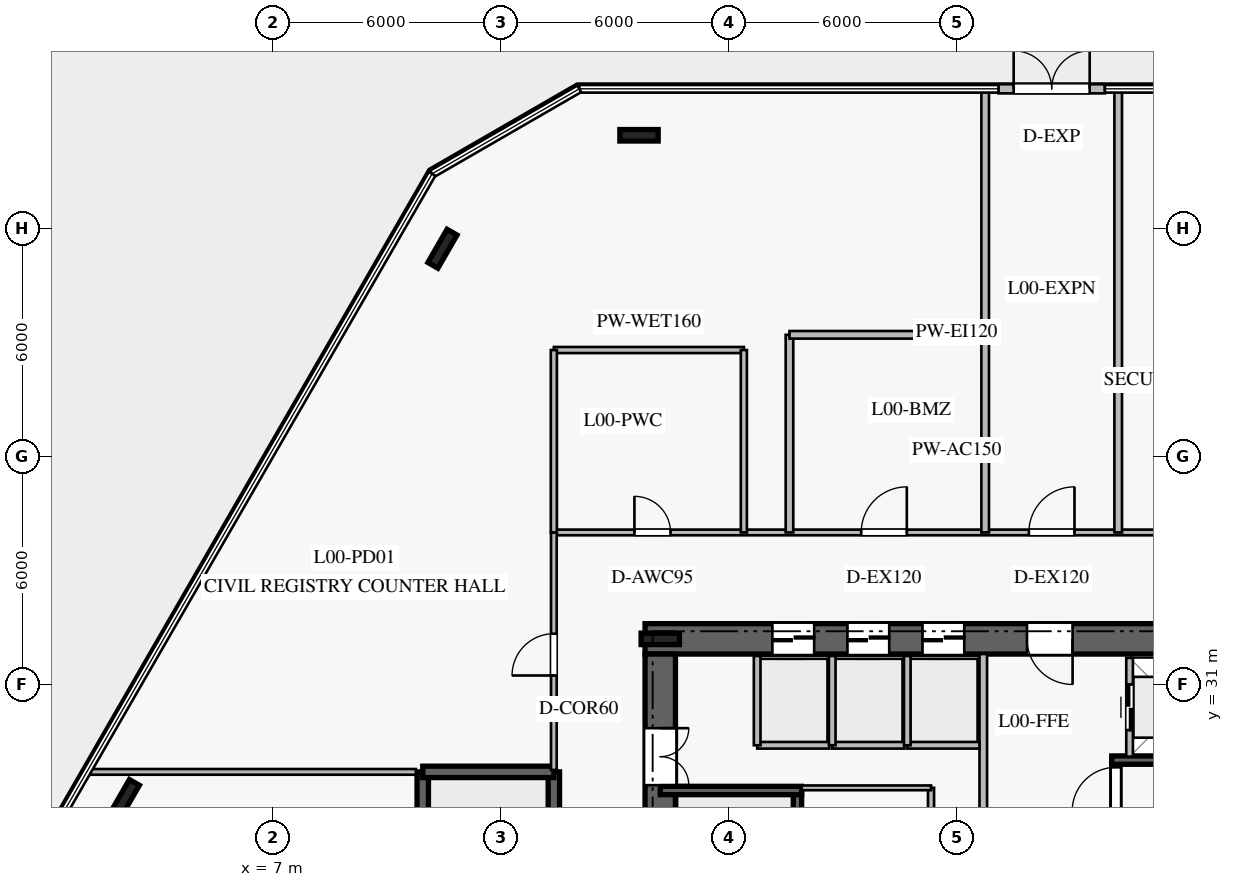
"""IFC4 building model, lengths in metres.
Left out: names, types, materials, properties, quantities, classifications, styles, units other than length and angle.
Written with IfcOpenShell. Run it as: python <this file> out.ifc"""

import sys

from ifc_helpers import new_model, si_unit, direction, frame, frame_2d, origin, origin_2d, place, context, subcontext, project, spatial, rectangle, i_section, extrude, element, fill, save


model = new_model("IFC4")
c1 = context("Model", 3, precision=1e-05, world=origin(), true_north=direction((0.0, 1.0)))
c2 = subcontext(c1, "Body", "Model", "MODEL_VIEW")
j1 = project(units=[si_unit("LENGTHUNIT", "METRE"), si_unit("PLANEANGLEUNIT", "RADIAN")], contexts=[c1])
p1 = place(None, origin())
s1 = spatial("IfcSite", under=j1, at=p1, CompositionType="ELEMENT")
p2 = place(p1, origin())
s2 = spatial("IfcBuilding", under=s1, at=p2, CompositionType="ELEMENT")
p3 = place(p2, origin())
s3 = spatial("IfcBuildingStorey", under=s2, at=p3, CompositionType="ELEMENT", Elevation=0.0)
p4 = place(p3, frame((33.2, 32.2, 0.0), z_axis=(0.0, 0.0, 1.0), x_axis=(-1.0, 0.0, 0.0)))
e1 = element("IfcWall", 1, at=p4, inside=s3, PredefinedType="SHEAR", context=c2, shape_type="SweptSolid", body=[
    extrude(rectangle(XDim=16.4, YDim=0.8, at=frame_2d((8.2, 0.0))), origin(), (0.0, 0.0, 1.0), 4.94),
])
p5 = place(p4, frame((5.15, 0.0, 0.0)))
e2 = element("IfcOpeningElement", 2, at=p5, cuts=e1, PredefinedType="OPENING", context=c2, shape_type="SweptSolid", body=[
    extrude(rectangle(XDim=1.2, YDim=2.25, at=frame_2d((0.6, 1.125))), frame((0.0, 0.41, 0.0), z_axis=(0.0, -1.0, 0.0), x_axis=(1.0, 0.0, 0.0)), (0.0, 0.0, 1.0), 0.82),
])
p6 = place(p4, frame((11.95, 0.0, 0.0)))
e3 = element("IfcOpeningElement", 3, at=p6, cuts=e1, PredefinedType="OPENING", context=c2, shape_type="SweptSolid", body=[
    extrude(rectangle(XDim=1.1, YDim=2.2, at=frame_2d((0.55, 1.1))), frame((0.0, 0.41, 0.0), z_axis=(0.0, -1.0, 0.0), x_axis=(1.0, 0.0, 0.0)), (0.0, 0.0, 1.0), 0.82),
])
p7 = place(p4, frame((9.975, 0.0, 0.0)))
e4 = element("IfcOpeningElement", 4, at=p7, cuts=e1, PredefinedType="OPENING", context=c2, shape_type="SweptSolid", body=[
    extrude(rectangle(XDim=1.1, YDim=2.2, at=frame_2d((0.55, 1.1))), frame((0.0, 0.41, 0.0), z_axis=(0.0, -1.0, 0.0), x_axis=(1.0, 0.0, 0.0)), (0.0, 0.0, 1.0), 0.82),
])
p8 = place(p4, frame((8.0, 0.0, 0.0)))
e5 = element("IfcOpeningElement", 5, at=p8, cuts=e1, PredefinedType="OPENING", context=c2, shape_type="SweptSolid", body=[
    extrude(rectangle(XDim=1.1, YDim=2.2, at=frame_2d((0.55, 1.1))), frame((0.0, 0.41, 0.0), z_axis=(0.0, -1.0, 0.0), x_axis=(1.0, 0.0, 0.0)), (0.0, 0.0, 1.0), 0.82),
])
p9 = place(p3, frame((17.2, 31.8, 0.0), z_axis=(0.0, 0.0, 1.0), x_axis=(0.0, -1.0, 0.0)))
e6 = element("IfcWall", 6, at=p9, inside=s3, PredefinedType="SHEAR", context=c2, shape_type="SweptSolid", body=[
    extrude(rectangle(XDim=13.6, YDim=0.8, at=frame_2d((6.8, 0.0))), origin(), (0.0, 0.0, 1.0), 4.94),
])
p10 = place(p9, frame((1.95, 0.0, 0.0)))
e7 = element("IfcOpeningElement", 7, at=p10, cuts=e6, PredefinedType="OPENING", context=c2, shape_type="SweptSolid", body=[
    extrude(rectangle(XDim=1.5, YDim=2.2, at=frame_2d((0.75, 1.1))), frame((0.0, 0.41, 0.0), z_axis=(0.0, -1.0, 0.0), x_axis=(1.0, 0.0, 0.0)), (0.0, 0.0, 1.0), 0.82),
])
p11 = place(p3, frame((17.2, 32.2, 0.0), z_axis=(0.0, 0.0, 1.0), x_axis=(1.0, 0.0, 0.0)))
e8 = element("IfcColumn", 8, at=p11, inside=s3, PredefinedType="COLUMN", context=c2, shape_type="SweptSolid", body=[
    extrude(i_section(OverallWidth=0.302, OverallDepth=1.008, WebThickness=0.021, FlangeThickness=0.04, at=origin_2d()), origin(), (0.0, 0.0, 1.0), 5.2),
])
p12 = place(p3, frame((20.81, 20.99, 0.0), z_axis=(0.0, 0.0, 1.0), x_axis=(0.0, 1.0, 0.0)))
e9 = element("IfcWall", 9, at=p12, inside=s3, PredefinedType="SOLIDWALL", context=c2, shape_type="SweptSolid", body=[
    extrude(rectangle(XDim=7.22, YDim=0.22, at=frame_2d((3.61, 0.0))), origin(), (0.0, 0.0, 1.0), 4.94),
])
p13 = place(p12, frame((0.18, 0.0, 0.0)))
e10 = element("IfcOpeningElement", 10, at=p13, cuts=e9, PredefinedType="OPENING", context=c2, shape_type="SweptSolid", body=[
    extrude(rectangle(XDim=1.15, YDim=2.2, at=frame_2d((0.575, 1.1))), frame((0.0, 0.12, 0.0), z_axis=(0.0, -1.0, 0.0), x_axis=(1.0, 0.0, 0.0)), (0.0, 0.0, 1.0), 0.24),
])
p14 = place(p3, frame((17.2, 28.21, 0.0), z_axis=(0.0, 0.0, 1.0), x_axis=(1.0, 0.0, 0.0)))
e11 = element("IfcWall", 11, at=p14, inside=s3, PredefinedType="SOLIDWALL", context=c2, shape_type="SweptSolid", body=[
    extrude(rectangle(XDim=3.72, YDim=0.22, at=frame_2d((1.86, 0.0))), origin(), (0.0, 0.0, 1.0), 4.94),
])
p15 = place(p3, frame((29.19, 21.79, 0.0), z_axis=(0.0, 0.0, 1.0), x_axis=(0.0, 1.0, 0.0)))
e12 = element("IfcWall", 12, at=p15, inside=s3, PredefinedType="SOLIDWALL", context=c2, shape_type="SweptSolid", body=[
    extrude(rectangle(XDim=7.22, YDim=0.22, at=frame_2d((3.61, 0.0))), origin(), (0.0, 0.0, 1.0), 4.94),
])
p16 = place(p15, frame((5.88, 0.0, 0.0)))
e13 = element("IfcOpeningElement", 13, at=p16, cuts=e12, PredefinedType="OPENING", context=c2, shape_type="SweptSolid", body=[
    extrude(rectangle(XDim=1.15, YDim=2.2, at=frame_2d((0.575, 1.1))), frame((0.0, 0.12, 0.0), z_axis=(0.0, -1.0, 0.0), x_axis=(1.0, 0.0, 0.0)), (0.0, 0.0, 1.0), 0.24),
])
p17 = place(p3, frame((29.08, 29.01, 0.0), z_axis=(0.0, 0.0, 1.0), x_axis=(1.0, 0.0, 0.0)))
e14 = element("IfcWall", 14, at=p17, inside=s3, PredefinedType="SOLIDWALL", context=c2, shape_type="SweptSolid", body=[
    extrude(rectangle(XDim=3.72, YDim=0.22, at=frame_2d((1.86, 0.0))), origin(), (0.0, 0.0, 1.0), 4.94),
])
p18 = place(p3, frame((14.4, 21.3, 0.0), z_axis=(0.0, 0.0, 1.0), x_axis=(0.0, 1.0, 0.0)))
e15 = element("IfcWall", 15, at=p18, inside=s3, PredefinedType="SOLIDWALL", context=c2, shape_type="SweptSolid", body=[
    extrude(rectangle(XDim=7.4, YDim=0.3, at=frame_2d((3.7, 0.0))), origin(), (0.0, 0.0, 1.0), 4.94),
])
p19 = place(p18, frame((0.22, 0.0, 0.0)))
e16 = element("IfcOpeningElement", 16, at=p19, cuts=e15, PredefinedType="OPENING", context=c2, shape_type="SweptSolid", body=[
    extrude(rectangle(XDim=1.15, YDim=2.2, at=frame_2d((0.575, 1.1))), frame((0.0, 0.16, 0.0), z_axis=(0.0, -1.0, 0.0), x_axis=(1.0, 0.0, 0.0)), (0.0, 0.0, 1.0), 0.32),
])
p20 = place(p3, frame((10.95, 21.3, 0.0), z_axis=(0.0, 0.0, 1.0), x_axis=(0.0, 1.0, 0.0)))
e17 = element("IfcWall", 17, at=p20, inside=s3, PredefinedType="SOLIDWALL", context=c2, shape_type="SweptSolid", body=[
    extrude(rectangle(XDim=7.4, YDim=0.3, at=frame_2d((3.7, 0.0))), origin(), (0.0, 0.0, 1.0), 4.94),
])
p21 = place(p3, frame((10.95, 28.7, 0.0), z_axis=(0.0, 0.0, 1.0), x_axis=(1.0, 0.0, 0.0)))
e18 = element("IfcWall", 18, at=p21, inside=s3, PredefinedType="SOLIDWALL", context=c2, shape_type="SweptSolid", body=[
    extrude(rectangle(XDim=3.45, YDim=0.3, at=frame_2d((1.725, 0.0))), origin(), (0.0, 0.0, 1.0), 4.94),
])
for number, where, z_axis, x_axis in (
    (19, (16.641, 45.45, 0.0), (0.0, 0.0, 1.0), (1.0, 0.0, 0.0)),
    (20, (11.469, 42.464, 0.0), (0.0, 0.0, 1.0), (0.5, 0.866, 0.0)),
    (21, (3.11, 27.986, 0.0), (0.0, 0.0, 1.0), (0.5, 0.866, 0.0)),
):
    element("IfcColumn", number, at=place(p3, frame(where, z_axis=z_axis, x_axis=x_axis)), inside=s3, PredefinedType="COLUMN", context=c2, shape_type="SweptSolid", body=[
        extrude(i_section(OverallWidth=0.302, OverallDepth=1.008, WebThickness=0.021, FlangeThickness=0.04, at=origin_2d()), origin(), (0.0, 0.0, 1.0), 5.2),
    ])
p22 = place(p3, frame((28.9, 46.673, 0.0), z_axis=(0.0, 0.0, 1.0), x_axis=(-1.0, 0.0, 0.0)))
e22 = element("IfcWall", 22, at=p22, inside=s3, PredefinedType="STANDARD", context=c2, shape_type="SweptSolid", body=[
    extrude(rectangle(XDim=2.8, YDim=0.24, at=frame_2d((1.4, 0.0))), origin(), (0.0, 0.0, 1.0), 4.94),
])
p23 = place(p22, frame((0.4, 0.0, 0.0)))
e23 = element("IfcOpeningElement", 23, at=p23, cuts=e22, PredefinedType="OPENING", context=c2, shape_type="SweptSolid", body=[
    extrude(rectangle(XDim=2.0, YDim=2.4, at=frame_2d((1.0, 1.2))), frame((0.0, 0.13, 0.0), z_axis=(0.0, -1.0, 0.0), x_axis=(1.0, 0.0, 0.0)), (0.0, 0.0, 1.0), 0.26),
])
p24 = place(p3, frame((25.7, 26.65, 0.0), z_axis=(0.0, 0.0, 1.0), x_axis=(0.0, 1.0, 0.0)))
e24 = element("IfcWall", 24, at=p24, inside=s3, PredefinedType="PARTITIONING", context=c2, shape_type="SweptSolid", body=[
    extrude(rectangle(XDim=5.15, YDim=0.2, at=frame_2d((2.575, 0.0))), origin(), (0.0, 0.0, 1.0), 4.94),
])
p25 = place(p3, frame((24.325, 23.35, 0.0), z_axis=(0.0, 0.0, 1.0), x_axis=(0.0, 1.0, 0.0)))
e25 = element("IfcWall", 25, at=p25, inside=s3, PredefinedType="PLUMBINGWALL", context=c2, shape_type="SweptSolid", body=[
    extrude(rectangle(XDim=4.93, YDim=0.16, at=frame_2d((2.465, 0.0))), origin(), (0.0, 0.0, 1.0), 4.94),
])
p26 = place(p25, frame((0.8, 0.0, 0.0)))
e26 = element("IfcOpeningElement", 26, at=p26, cuts=e25, PredefinedType="OPENING", context=c2, shape_type="SweptSolid", body=[
    extrude(rectangle(XDim=0.95, YDim=2.1, at=frame_2d((0.475, 1.05))), frame((0.0, 0.09, 0.0), z_axis=(0.0, -1.0, 0.0), x_axis=(1.0, 0.0, 0.0)), (0.0, 0.0, 1.0), 0.18),
])
p27 = place(p25, frame((3.26, 0.0, 0.0)))
e27 = element("IfcOpeningElement", 27, at=p27, cuts=e25, PredefinedType="OPENING", context=c2, shape_type="SweptSolid", body=[
    extrude(rectangle(XDim=0.9, YDim=2.1, at=frame_2d((0.45, 1.05))), frame((0.0, 0.09, 0.0), z_axis=(0.0, -1.0, 0.0), x_axis=(1.0, 0.0, 0.0)), (0.0, 0.0, 1.0), 0.18),
])
p28 = place(p3, frame((20.92, 28.28, 0.0), z_axis=(0.0, 0.0, 1.0), x_axis=(1.0, 0.0, 0.0)))
e28 = element("IfcWall", 28, at=p28, inside=s3, PredefinedType="PARTITIONING", context=c2, shape_type="SweptSolid", body=[
    extrude(rectangle(XDim=3.405, YDim=0.125, at=frame_2d((1.703, 0.0))), origin(), (0.0, 0.0, 1.0), 4.94),
])
p29 = place(p3, frame((19.75, 29.4, 0.0), z_axis=(0.0, 0.0, 1.0), x_axis=(1.0, 0.0, 0.0)))
e29 = element("IfcWall", 29, at=p29, inside=s3, PredefinedType="PARTITIONING", context=c2, shape_type="SweptSolid", body=[
    extrude(rectangle(XDim=1.9, YDim=0.175, at=frame_2d((0.95, 0.0))), origin(), (0.0, 0.0, 1.0), 4.94),
])
p30 = place(p3, frame((19.75, 29.4, 0.0), z_axis=(0.0, 0.0, 1.0), x_axis=(0.0, 1.0, 0.0)))
e30 = element("IfcWall", 30, at=p30, inside=s3, PredefinedType="PARTITIONING", context=c2, shape_type="SweptSolid", body=[
    extrude(rectangle(XDim=2.35, YDim=0.175, at=frame_2d((1.175, 0.0))), origin(), (0.0, 0.0, 1.0), 4.94),
])
p31 = place(p3, frame((21.725, 29.4, 0.0), z_axis=(0.0, 0.0, 1.0), x_axis=(1.0, 0.0, 0.0)))
e31 = element("IfcWall", 31, at=p31, inside=s3, PredefinedType="PARTITIONING", context=c2, shape_type="SweptSolid", body=[
    extrude(rectangle(XDim=1.9, YDim=0.175, at=frame_2d((0.95, 0.0))), origin(), (0.0, 0.0, 1.0), 4.94),
])
p32 = place(p3, frame((21.725, 29.4, 0.0), z_axis=(0.0, 0.0, 1.0), x_axis=(0.0, 1.0, 0.0)))
e32 = element("IfcWall", 32, at=p32, inside=s3, PredefinedType="PARTITIONING", context=c2, shape_type="SweptSolid", body=[
    extrude(rectangle(XDim=2.35, YDim=0.175, at=frame_2d((1.175, 0.0))), origin(), (0.0, 0.0, 1.0), 4.94),
])
p33 = place(p3, frame((23.7, 29.4, 0.0), z_axis=(0.0, 0.0, 1.0), x_axis=(1.0, 0.0, 0.0)))
e33 = element("IfcWall", 33, at=p33, inside=s3, PredefinedType="PARTITIONING", context=c2, shape_type="SweptSolid", body=[
    extrude(rectangle(XDim=1.9, YDim=0.175, at=frame_2d((0.95, 0.0))), origin(), (0.0, 0.0, 1.0), 4.94),
])
p34 = place(p3, frame((23.7, 29.4, 0.0), z_axis=(0.0, 0.0, 1.0), x_axis=(0.0, 1.0, 0.0)))
e34 = element("IfcWall", 34, at=p34, inside=s3, PredefinedType="PARTITIONING", context=c2, shape_type="SweptSolid", body=[
    extrude(rectangle(XDim=2.35, YDim=0.175, at=frame_2d((1.175, 0.0))), origin(), (0.0, 0.0, 1.0), 4.94),
])
p35 = place(p3, frame((29.55, 29.1, 0.0), z_axis=(0.0, 0.0, 1.0), x_axis=(0.0, 1.0, 0.0)))
e35 = element("IfcWall", 35, at=p35, inside=s3, PredefinedType="PARTITIONING", context=c2, shape_type="SweptSolid", body=[
    extrude(rectangle(XDim=2.6, YDim=0.175, at=frame_2d((1.3, 0.0))), origin(), (0.0, 0.0, 1.0), 4.94),
])
p36 = place(p35, frame((0.7, 0.0, 0.0)))
e36 = element("IfcOpeningElement", 36, at=p36, cuts=e35, PredefinedType="OPENING", context=c2, shape_type="SweptSolid", body=[
    extrude(rectangle(XDim=1.2, YDim=2.2, at=frame_2d((0.6, 1.1))), frame((0.0, 0.098, 0.0), z_axis=(0.0, -1.0, 0.0), x_axis=(1.0, 0.0, 0.0)), (0.0, 0.0, 1.0), 0.195),
])
p37 = place(p3, frame((14.4, 35.0, 0.0), z_axis=(0.0, 0.0, 1.0), x_axis=(1.0, 0.0, 0.0)))
e37 = element("IfcWall", 37, at=p37, inside=s3, PredefinedType="PARTITIONING", context=c2, shape_type="SweptSolid", body=[
    extrude(rectangle(XDim=21.2, YDim=0.15, at=frame_2d((10.6, 0.0))), origin(), (0.0, 0.0, 1.0), 4.39),
])
p38 = place(p37, frame((12.5, 0.0, 0.0)))
e38 = element("IfcOpeningElement", 38, at=p38, cuts=e37, PredefinedType="OPENING", context=c2, shape_type="SweptSolid", body=[
    extrude(rectangle(XDim=1.2, YDim=2.25, at=frame_2d((0.6, 1.125))), frame((0.0, 0.085, 0.0), z_axis=(0.0, -1.0, 0.0), x_axis=(1.0, 0.0, 0.0)), (0.0, 0.0, 1.0), 0.17),
])
p39 = place(p37, frame((2.12, 0.0, 0.0)))
e39 = element("IfcOpeningElement", 39, at=p39, cuts=e37, PredefinedType="OPENING", context=c2, shape_type="SweptSolid", body=[
    extrude(rectangle(XDim=0.95, YDim=2.1, at=frame_2d((0.475, 1.05))), frame((0.0, 0.085, 0.0), z_axis=(0.0, -1.0, 0.0), x_axis=(1.0, 0.0, 0.0)), (0.0, 0.0, 1.0), 0.17),
])
p40 = place(p37, frame((8.088, 0.0, 0.0)))
e40 = element("IfcOpeningElement", 40, at=p40, cuts=e37, PredefinedType="OPENING", context=c2, shape_type="SweptSolid", body=[
    extrude(rectangle(XDim=1.2, YDim=2.25, at=frame_2d((0.6, 1.125))), frame((0.0, 0.085, 0.0), z_axis=(0.0, -1.0, 0.0), x_axis=(1.0, 0.0, 0.0)), (0.0, 0.0, 1.0), 0.17),
])
p41 = place(p37, frame((17.291, 0.0, 0.0)))
e41 = element("IfcOpeningElement", 41, at=p41, cuts=e37, PredefinedType="OPENING", context=c2, shape_type="SweptSolid", body=[
    extrude(rectangle(XDim=1.1, YDim=2.2, at=frame_2d((0.55, 1.1))), frame((0.0, 0.085, 0.0), z_axis=(0.0, -1.0, 0.0), x_axis=(1.0, 0.0, 0.0)), (0.0, 0.0, 1.0), 0.17),
])
p42 = place(p3, frame((14.4, 28.75, 0.0), z_axis=(0.0, 0.0, 1.0), x_axis=(0.0, 1.0, 0.0)))
e42 = element("IfcWall", 42, at=p42, inside=s3, PredefinedType="PARTITIONING", context=c2, shape_type="SweptSolid", body=[
    extrude(rectangle(XDim=6.25, YDim=0.15, at=frame_2d((3.125, 0.0))), origin(), (0.0, 0.0, 1.0), 4.94),
])
p43 = place(p42, frame((2.486, 0.0, 0.0)))
e43 = element("IfcOpeningElement", 43, at=p43, cuts=e42, PredefinedType="OPENING", context=c2, shape_type="SweptSolid", body=[
    extrude(rectangle(XDim=1.1, YDim=2.2, at=frame_2d((0.55, 1.1))), frame((0.0, 0.085, 0.0), z_axis=(0.0, -1.0, 0.0), x_axis=(1.0, 0.0, 0.0)), (0.0, 0.0, 1.0), 0.17),
])
p44 = place(p3, frame((14.4, 39.8, 0.0), z_axis=(0.0, 0.0, 1.0), x_axis=(1.0, 0.0, 0.0)))
e44 = element("IfcWall", 44, at=p44, inside=s3, PredefinedType="PLUMBINGWALL", context=c2, shape_type="SweptSolid", body=[
    extrude(rectangle(XDim=5.0, YDim=0.16, at=frame_2d((2.5, 0.0))), origin(), (0.0, 0.0, 1.0), 4.39),
])
p45 = place(p3, frame((19.4, 35.0, 0.0), z_axis=(0.0, 0.0, 1.0), x_axis=(0.0, 1.0, 0.0)))
e45 = element("IfcWall", 45, at=p45, inside=s3, PredefinedType="PLUMBINGWALL", context=c2, shape_type="SweptSolid", body=[
    extrude(rectangle(XDim=4.8, YDim=0.16, at=frame_2d((2.4, 0.0))), origin(), (0.0, 0.0, 1.0), 4.94),
])
p46 = place(p3, frame((14.4, 35.0, 0.0), z_axis=(0.0, 0.0, 1.0), x_axis=(0.0, 1.0, 0.0)))
e46 = element("IfcWall", 46, at=p46, inside=s3, PredefinedType="PLUMBINGWALL", context=c2, shape_type="SweptSolid", body=[
    extrude(rectangle(XDim=4.8, YDim=0.16, at=frame_2d((2.4, 0.0))), origin(), (0.0, 0.0, 1.0), 4.39),
])
for number, where, z_axis, x_axis in (
    (47, (25.75, 35.0, 0.0), (0.0, 0.0, 1.0), (0.0, 1.0, 0.0)),
    (48, (29.25, 35.0, 0.0), (0.0, 0.0, 1.0), (0.0, 1.0, 0.0)),
):
    element("IfcWall", number, at=place(p3, frame(where, z_axis=z_axis, x_axis=x_axis)), inside=s3, PredefinedType="PARTITIONING", context=c2, shape_type="SweptSolid", body=[
        extrude(rectangle(XDim=11.65, YDim=0.2, at=frame_2d((5.825, 0.0))), origin(), (0.0, 0.0, 1.0), 4.24),
    ])
p47 = place(p3, frame((20.6, 35.0, 0.0), z_axis=(0.0, 0.0, 1.0), x_axis=(0.0, 1.0, 0.0)))
e49 = element("IfcWall", 49, at=p47, inside=s3, PredefinedType="PARTITIONING", context=c2, shape_type="SweptSolid", body=[
    extrude(rectangle(XDim=5.2, YDim=0.2, at=frame_2d((2.6, 0.0))), origin(), (0.0, 0.0, 1.0), 4.94),
])
p48 = place(p3, frame((20.6, 40.2, 0.0), z_axis=(0.0, 0.0, 1.0), x_axis=(1.0, 0.0, 0.0)))
e50 = element("IfcWall", 50, at=p48, inside=s3, PredefinedType="PARTITIONING", context=c2, shape_type="SweptSolid", body=[
    extrude(rectangle(XDim=5.15, YDim=0.2, at=frame_2d((2.575, 0.0))), origin(), (0.0, 0.0, 1.0), 4.94),
])
p49 = place(p3, frame((2.08, 28.7, 0.0), z_axis=(0.0, 0.0, 1.0), x_axis=(1.0, 0.0, 0.0)))
e51 = element("IfcWall", 51, at=p49, inside=s3, PredefinedType="PARTITIONING", context=c2, shape_type="SweptSolid", body=[
    extrude(rectangle(XDim=8.69, YDim=0.15, at=frame_2d((4.345, 0.0))), origin(), (0.0, 0.0, 1.0), 4.24),
])
p50 = place(p23, frame((2.0, 0.0, 0.0), z_axis=(0.0, 0.0, 1.0), x_axis=(-1.0, 0.0, 0.0)))
e52 = element("IfcDoor", 52, at=p50, inside=s3, OperationType="DOUBLE_DOOR_SINGLE_SWING", PredefinedType="DOOR", context=c2, shape_type="SweptSolid", body=[
    extrude(rectangle(XDim=2.0, YDim=2.4, at=frame_2d((1.0, 1.2))), frame((0.0, 0.025, 0.0), z_axis=(0.0, -1.0, 0.0), x_axis=(1.0, 0.0, 0.0)), (0.0, 0.0, 1.0), 0.05),
])
fill(e23, e52)
p51 = place(p16, origin())
e53 = element("IfcDoor", 53, at=p51, inside=s3, OperationType="SINGLE_SWING_LEFT", PredefinedType="DOOR", context=c2, shape_type="SweptSolid", body=[
    extrude(rectangle(XDim=1.15, YDim=2.2, at=frame_2d((0.575, 1.1))), frame((0.0, 0.025, 0.0), z_axis=(0.0, -1.0, 0.0), x_axis=(1.0, 0.0, 0.0)), (0.0, 0.0, 1.0), 0.05),
])
fill(e13, e53)
p52 = place(p5, origin())
e54 = element("IfcDoor", 54, at=p52, inside=s3, OperationType="SINGLE_SWING_LEFT", PredefinedType="DOOR", context=c2, shape_type="SweptSolid", body=[
    extrude(rectangle(XDim=1.2, YDim=2.25, at=frame_2d((0.6, 1.125))), frame((0.0, 0.025, 0.0), z_axis=(0.0, -1.0, 0.0), x_axis=(1.0, 0.0, 0.0)), (0.0, 0.0, 1.0), 0.05),
])
fill(e2, e54)
p53 = place(p10, origin())
e55 = element("IfcDoor", 55, at=p53, inside=s3, OperationType="DOUBLE_DOOR_SINGLE_SWING", PredefinedType="DOOR", context=c2, shape_type="SweptSolid", body=[
    extrude(rectangle(XDim=1.5, YDim=2.2, at=frame_2d((0.75, 1.1))), frame((0.0, 0.025, 0.0), z_axis=(0.0, -1.0, 0.0), x_axis=(1.0, 0.0, 0.0)), (0.0, 0.0, 1.0), 0.05),
])
fill(e7, e55)
p54 = place(p6, origin())
e56 = element("IfcDoor", 56, at=p54, inside=s3, OperationType="DOUBLE_DOOR_SLIDING", PredefinedType="DOOR", context=c2, shape_type="SweptSolid", body=[
    extrude(rectangle(XDim=1.1, YDim=2.2, at=frame_2d((0.55, 1.1))), frame((0.0, 0.025, 0.0), z_axis=(0.0, -1.0, 0.0), x_axis=(1.0, 0.0, 0.0)), (0.0, 0.0, 1.0), 0.05),
])
fill(e3, e56)
p55 = place(p7, origin())
e57 = element("IfcDoor", 57, at=p55, inside=s3, OperationType="DOUBLE_DOOR_SLIDING", PredefinedType="DOOR", context=c2, shape_type="SweptSolid", body=[
    extrude(rectangle(XDim=1.1, YDim=2.2, at=frame_2d((0.55, 1.1))), frame((0.0, 0.025, 0.0), z_axis=(0.0, -1.0, 0.0), x_axis=(1.0, 0.0, 0.0)), (0.0, 0.0, 1.0), 0.05),
])
fill(e4, e57)
p56 = place(p8, origin())
e58 = element("IfcDoor", 58, at=p56, inside=s3, OperationType="DOUBLE_DOOR_SLIDING", PredefinedType="DOOR", context=c2, shape_type="SweptSolid", body=[
    extrude(rectangle(XDim=1.1, YDim=2.2, at=frame_2d((0.55, 1.1))), frame((0.0, 0.025, 0.0), z_axis=(0.0, -1.0, 0.0), x_axis=(1.0, 0.0, 0.0)), (0.0, 0.0, 1.0), 0.05),
])
fill(e5, e58)
p57 = place(p36, origin())
e59 = element("IfcDoor", 59, at=p57, inside=s3, OperationType="DOUBLE_DOOR_SLIDING", PredefinedType="DOOR", context=c2, shape_type="SweptSolid", body=[
    extrude(rectangle(XDim=1.2, YDim=2.2, at=frame_2d((0.6, 1.1))), frame((0.0, 0.025, 0.0), z_axis=(0.0, -1.0, 0.0), x_axis=(1.0, 0.0, 0.0)), (0.0, 0.0, 1.0), 0.05),
])
fill(e36, e59)
p58 = place(p38, origin())
e60 = element("IfcDoor", 60, at=p58, inside=s3, OperationType="SINGLE_SWING_RIGHT", PredefinedType="DOOR", context=c2, shape_type="SweptSolid", body=[
    extrude(rectangle(XDim=1.2, YDim=2.25, at=frame_2d((0.6, 1.125))), frame((0.0, 0.025, 0.0), z_axis=(0.0, -1.0, 0.0), x_axis=(1.0, 0.0, 0.0)), (0.0, 0.0, 1.0), 0.05),
])
fill(e38, e60)
p59 = place(p39, origin())
e61 = element("IfcDoor", 61, at=p59, inside=s3, OperationType="SINGLE_SWING_LEFT", PredefinedType="DOOR", context=c2, shape_type="SweptSolid", body=[
    extrude(rectangle(XDim=0.95, YDim=2.1, at=frame_2d((0.475, 1.05))), frame((0.0, 0.025, 0.0), z_axis=(0.0, -1.0, 0.0), x_axis=(1.0, 0.0, 0.0)), (0.0, 0.0, 1.0), 0.05),
])
fill(e39, e61)
p60 = place(p40, origin())
e62 = element("IfcDoor", 62, at=p60, inside=s3, OperationType="SINGLE_SWING_RIGHT", PredefinedType="DOOR", context=c2, shape_type="SweptSolid", body=[
    extrude(rectangle(XDim=1.2, YDim=2.25, at=frame_2d((0.6, 1.125))), frame((0.0, 0.025, 0.0), z_axis=(0.0, -1.0, 0.0), x_axis=(1.0, 0.0, 0.0)), (0.0, 0.0, 1.0), 0.05),
])
fill(e40, e62)
p61 = place(p43, origin())
e63 = element("IfcDoor", 63, at=p61, inside=s3, OperationType="SINGLE_SWING_LEFT", PredefinedType="DOOR", context=c2, shape_type="SweptSolid", body=[
    extrude(rectangle(XDim=1.1, YDim=2.2, at=frame_2d((0.55, 1.1))), frame((0.0, 0.025, 0.0), z_axis=(0.0, -1.0, 0.0), x_axis=(1.0, 0.0, 0.0)), (0.0, 0.0, 1.0), 0.05),
])
fill(e43, e63)
save(model, sys.argv[1])
